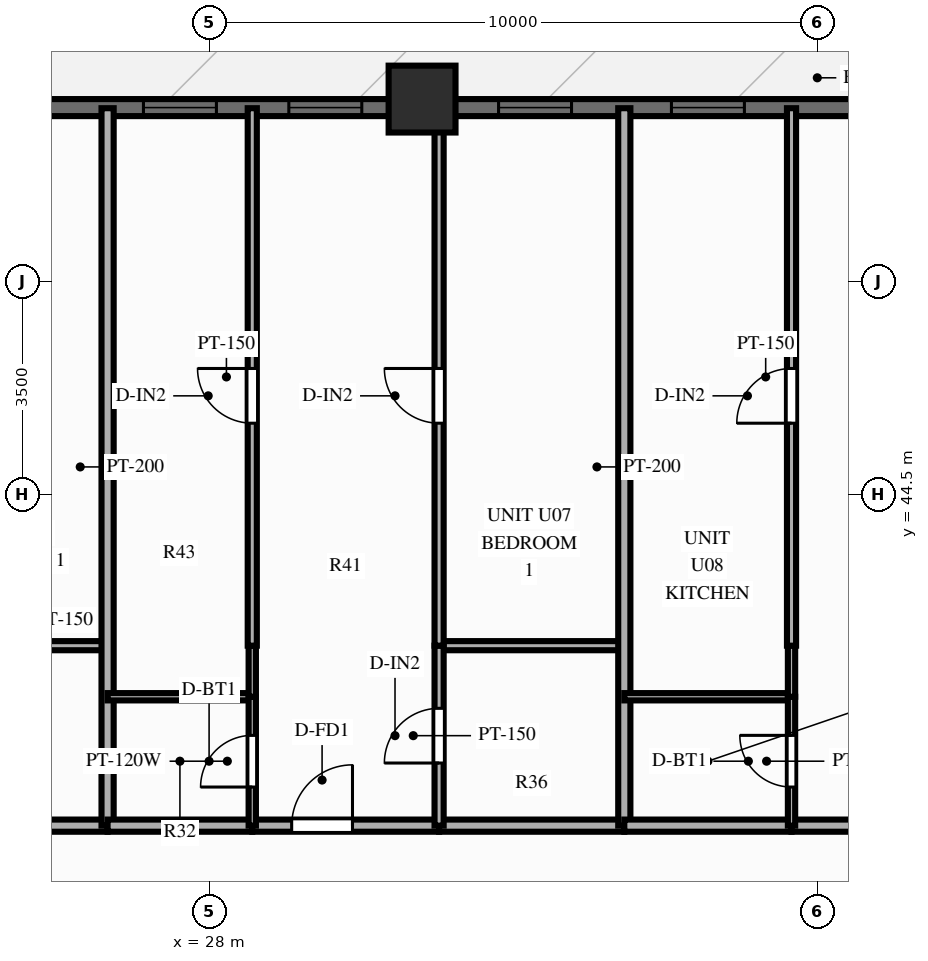
"""IFC4 building model, lengths in metres.
Left out: names, types, materials, properties, quantities, classifications, styles, units other than length and angle.
Written with IfcOpenShell. Run it as: python <this file> out.ifc"""

import sys

from ifc_helpers import new_model, si_unit, direction, frame, frame_2d, origin, origin_2d, place, context, subcontext, project, spatial, rectangle, extrude, source, transform, mapped, element, fill, save


model = new_model("IFC4")
c1 = context("Model", 3, precision=1e-05, world=origin(), true_north=direction((0.0, 1.0)))
c2 = subcontext(c1, "Body", "Model", "MODEL_VIEW")
j1 = project(units=[si_unit("LENGTHUNIT", "METRE"), si_unit("PLANEANGLEUNIT", "RADIAN")], contexts=[c1])
p1 = place(None, origin())
s1 = spatial("IfcSite", under=j1, at=p1, CompositionType="ELEMENT")
p2 = place(p1, origin())
s2 = spatial("IfcBuilding", under=s1, at=p2, CompositionType="ELEMENT")
p3 = place(p2, frame((0.0, 0.0, 61.4)))
s3 = spatial("IfcBuildingStorey", under=s2, at=p3, CompositionType="ELEMENT", Elevation=61.4)
m1 = source(origin(), c2, "Body", "SweptSolid", [
    extrude(rectangle(XDim=1.1, YDim=1.1, at=origin_2d()), origin(), (0.0, 0.0, 1.0), 3.0),
])
p4 = place(p3, frame((31.5, 51.0, 0.0), z_axis=(0.0, 0.0, 1.0), x_axis=(1.0, 0.0, 0.0)))
e1 = element("IfcColumn", 1, at=p4, inside=s3, PredefinedType="COLUMN", context=c2, shape_type="MappedRepresentation", body=[
    mapped(m1, transform((0.0, 0.0, 0.0), scale=1.0)),
])
p5 = place(p3, frame((15.5, 50.86, 0.0), z_axis=(0.0, 0.0, 1.0), x_axis=(1.0, 0.0, 0.0)))
e2 = element("IfcWall", 2, at=p5, inside=s3, PredefinedType="SOLIDWALL", context=c2, shape_type="SweptSolid", body=[
    extrude(rectangle(XDim=45.0, YDim=0.28, at=frame_2d((22.5, 0.0))), origin(), (0.0, 0.0, 1.0), 2.28),
])
p6 = place(p5, frame((0.76, 0.0, 0.25)))
e3 = element("IfcOpeningElement", 3, at=p6, cuts=e2, PredefinedType="OPENING", context=c2, shape_type="SweptSolid", body=[
    extrude(rectangle(XDim=1.2, YDim=1.5, at=frame_2d((0.6, 0.75))), frame((0.0, 0.152, 0.0), z_axis=(0.0, -1.0, 0.0), x_axis=(1.0, 0.0, 0.0)), (0.0, 0.0, 1.0), 0.304),
])
p7 = place(p5, frame((2.92, 0.0, 0.25)))
e4 = element("IfcOpeningElement", 4, at=p7, cuts=e2, PredefinedType="OPENING", context=c2, shape_type="SweptSolid", body=[
    extrude(rectangle(XDim=1.2, YDim=1.5, at=frame_2d((0.6, 0.75))), frame((0.0, 0.152, 0.0), z_axis=(0.0, -1.0, 0.0), x_axis=(1.0, 0.0, 0.0)), (0.0, 0.0, 1.0), 0.304),
])
p8 = place(p5, frame((5.554, 0.0, 0.25)))
e5 = element("IfcOpeningElement", 5, at=p8, cuts=e2, PredefinedType="OPENING", context=c2, shape_type="SweptSolid", body=[
    extrude(rectangle(XDim=1.2, YDim=1.5, at=frame_2d((0.6, 0.75))), frame((0.0, 0.152, 0.0), z_axis=(0.0, -1.0, 0.0), x_axis=(1.0, 0.0, 0.0)), (0.0, 0.0, 1.0), 0.304),
])
p9 = place(p5, frame((8.613, 0.0, 0.25)))
e6 = element("IfcOpeningElement", 6, at=p9, cuts=e2, PredefinedType="OPENING", context=c2, shape_type="SweptSolid", body=[
    extrude(rectangle(XDim=1.2, YDim=1.5, at=frame_2d((0.6, 0.75))), frame((0.0, 0.152, 0.0), z_axis=(0.0, -1.0, 0.0), x_axis=(1.0, 0.0, 0.0)), (0.0, 0.0, 1.0), 0.304),
])
p10 = place(p5, frame((11.418, 0.0, 0.25)))
e7 = element("IfcOpeningElement", 7, at=p10, cuts=e2, PredefinedType="OPENING", context=c2, shape_type="SweptSolid", body=[
    extrude(rectangle(XDim=1.2, YDim=1.5, at=frame_2d((0.6, 0.75))), frame((0.0, 0.152, 0.0), z_axis=(0.0, -1.0, 0.0), x_axis=(1.0, 0.0, 0.0)), (0.0, 0.0, 1.0), 0.304),
])
p11 = place(p5, frame((13.809, 0.0, 0.25)))
e8 = element("IfcOpeningElement", 8, at=p11, cuts=e2, PredefinedType="OPENING", context=c2, shape_type="SweptSolid", body=[
    extrude(rectangle(XDim=1.2, YDim=1.5, at=frame_2d((0.6, 0.75))), frame((0.0, 0.152, 0.0), z_axis=(0.0, -1.0, 0.0), x_axis=(1.0, 0.0, 0.0)), (0.0, 0.0, 1.0), 0.304),
])
p12 = place(p5, frame((17.258, 0.0, 0.25)))
e9 = element("IfcOpeningElement", 9, at=p12, cuts=e2, PredefinedType="OPENING", context=c2, shape_type="SweptSolid", body=[
    extrude(rectangle(XDim=1.2, YDim=1.5, at=frame_2d((0.6, 0.75))), frame((0.0, 0.152, 0.0), z_axis=(0.0, -1.0, 0.0), x_axis=(1.0, 0.0, 0.0)), (0.0, 0.0, 1.0), 0.304),
])
p13 = place(p5, frame((20.101, 0.0, 0.25)))
e10 = element("IfcOpeningElement", 10, at=p13, cuts=e2, PredefinedType="OPENING", context=c2, shape_type="SweptSolid", body=[
    extrude(rectangle(XDim=1.2, YDim=1.5, at=frame_2d((0.6, 0.75))), frame((0.0, 0.152, 0.0), z_axis=(0.0, -1.0, 0.0), x_axis=(1.0, 0.0, 0.0)), (0.0, 0.0, 1.0), 0.304),
])
p14 = place(p5, frame((24.793, 0.0, 0.0)))
e11 = element("IfcOpeningElement", 11, at=p14, cuts=e2, PredefinedType="OPENING", context=c2, shape_type="SweptSolid", body=[
    extrude(rectangle(XDim=1.1, YDim=2.15, at=frame_2d((0.55, 1.075))), frame((0.0, 0.152, 0.0), z_axis=(0.0, -1.0, 0.0), x_axis=(1.0, 0.0, 0.0)), (0.0, 0.0, 1.0), 0.304),
])
p15 = place(p5, frame((31.021, 0.0, 0.25)))
e12 = element("IfcOpeningElement", 12, at=p15, cuts=e2, PredefinedType="OPENING", context=c2, shape_type="SweptSolid", body=[
    extrude(rectangle(XDim=1.2, YDim=1.5, at=frame_2d((0.6, 0.75))), frame((0.0, 0.152, 0.0), z_axis=(0.0, -1.0, 0.0), x_axis=(1.0, 0.0, 0.0)), (0.0, 0.0, 1.0), 0.304),
])
p16 = place(p5, frame((33.869, 0.0, 0.25)))
e13 = element("IfcOpeningElement", 13, at=p16, cuts=e2, PredefinedType="OPENING", context=c2, shape_type="SweptSolid", body=[
    extrude(rectangle(XDim=1.2, YDim=1.5, at=frame_2d((0.6, 0.75))), frame((0.0, 0.152, 0.0), z_axis=(0.0, -1.0, 0.0), x_axis=(1.0, 0.0, 0.0)), (0.0, 0.0, 1.0), 0.304),
])
p17 = place(p5, frame((37.98, 0.0, 0.25)))
e14 = element("IfcOpeningElement", 14, at=p17, cuts=e2, PredefinedType="OPENING", context=c2, shape_type="SweptSolid", body=[
    extrude(rectangle(XDim=1.2, YDim=1.5, at=frame_2d((0.6, 0.75))), frame((0.0, 0.152, 0.0), z_axis=(0.0, -1.0, 0.0), x_axis=(1.0, 0.0, 0.0)), (0.0, 0.0, 1.0), 0.304),
])
p18 = place(p5, frame((42.277, 0.0, 0.25)))
e15 = element("IfcOpeningElement", 15, at=p18, cuts=e2, PredefinedType="OPENING", context=c2, shape_type="SweptSolid", body=[
    extrude(rectangle(XDim=1.2, YDim=1.5, at=frame_2d((0.6, 0.75))), frame((0.0, 0.152, 0.0), z_axis=(0.0, -1.0, 0.0), x_axis=(1.0, 0.0, 0.0)), (0.0, 0.0, 1.0), 0.304),
])
p19 = place(p3, frame((23.099, 39.05, 0.0), z_axis=(0.0, 0.0, 1.0), x_axis=(1.0, 0.0, 0.0)))
e16 = element("IfcWall", 16, at=p19, inside=s3, PredefinedType="PARTITIONING", context=c2, shape_type="SweptSolid", body=[
    extrude(rectangle(XDim=3.229, YDim=0.2, at=frame_2d((1.615, 0.0))), origin(), (0.0, 0.0, 1.0), 2.79),
])
p20 = place(p3, frame((23.099, 42.01, 0.0), z_axis=(0.0, 0.0, 1.0), x_axis=(1.0, 0.0, 0.0)))
e17 = element("IfcWall", 17, at=p20, inside=s3, PredefinedType="PARTITIONING", context=c2, shape_type="SweptSolid", body=[
    extrude(rectangle(XDim=3.229, YDim=0.15, at=frame_2d((1.615, 0.0))), origin(), (0.0, 0.0, 1.0), 2.79),
])
p21 = place(p3, frame((26.328, 39.05, 0.0), z_axis=(0.0, 0.0, 1.0), x_axis=(0.0, 1.0, 0.0)))
e18 = element("IfcWall", 18, at=p21, inside=s3, PredefinedType="PARTITIONING", context=c2, shape_type="SweptSolid", body=[
    extrude(rectangle(XDim=11.8, YDim=0.2, at=frame_2d((5.9, 0.0))), origin(), (0.0, 0.0, 1.0), 2.79),
])
p22 = place(p3, frame((26.328, 39.05, 0.0), z_axis=(0.0, 0.0, 1.0), x_axis=(1.0, 0.0, 0.0)))
e19 = element("IfcWall", 19, at=p22, inside=s3, PredefinedType="PARTITIONING", context=c2, shape_type="SweptSolid", body=[
    extrude(rectangle(XDim=2.38, YDim=0.2, at=frame_2d((1.19, 0.0))), origin(), (0.0, 0.0, 1.0), 2.79),
])
p23 = place(p3, frame((28.708, 39.05, 0.0), z_axis=(0.0, 0.0, 1.0), x_axis=(1.0, 0.0, 0.0)))
e20 = element("IfcWall", 20, at=p23, inside=s3, PredefinedType="PARTITIONING", context=c2, shape_type="SweptSolid", body=[
    extrude(rectangle(XDim=3.073, YDim=0.2, at=frame_2d((1.536, 0.0))), origin(), (0.0, 0.0, 1.0), 2.79),
])
p24 = place(p23, frame((0.648, 0.0, 0.0)))
e21 = element("IfcOpeningElement", 21, at=p24, cuts=e20, PredefinedType="OPENING", context=c2, shape_type="SweptSolid", body=[
    extrude(rectangle(XDim=1.0, YDim=2.15, at=frame_2d((0.5, 1.075))), frame((0.0, 0.112, 0.0), z_axis=(0.0, -1.0, 0.0), x_axis=(1.0, 0.0, 0.0)), (0.0, 0.0, 1.0), 0.224),
])
p25 = place(p3, frame((31.78, 39.05, 0.0), z_axis=(0.0, 0.0, 1.0), x_axis=(1.0, 0.0, 0.0)))
e22 = element("IfcWall", 22, at=p25, inside=s3, PredefinedType="PARTITIONING", context=c2, shape_type="SweptSolid", body=[
    extrude(rectangle(XDim=3.046, YDim=0.2, at=frame_2d((1.523, 0.0))), origin(), (0.0, 0.0, 1.0), 2.79),
])
p26 = place(p3, frame((26.328, 41.17, 0.0), z_axis=(0.0, 0.0, 1.0), x_axis=(1.0, 0.0, 0.0)))
e23 = element("IfcWall", 23, at=p26, inside=s3, PredefinedType="PARTITIONING", context=c2, shape_type="SweptSolid", body=[
    extrude(rectangle(XDim=2.38, YDim=0.12, at=frame_2d((1.19, 0.0))), origin(), (0.0, 0.0, 1.0), 2.79),
])
p27 = place(p3, frame((31.78, 42.01, 0.0), z_axis=(0.0, 0.0, 1.0), x_axis=(1.0, 0.0, 0.0)))
e24 = element("IfcWall", 24, at=p27, inside=s3, PredefinedType="PARTITIONING", context=c2, shape_type="SweptSolid", body=[
    extrude(rectangle(XDim=3.046, YDim=0.15, at=frame_2d((1.523, 0.0))), origin(), (0.0, 0.0, 1.0), 2.79),
])
p28 = place(p3, frame((28.708, 39.05, 0.0), z_axis=(0.0, 0.0, 1.0), x_axis=(0.0, 1.0, 0.0)))
e25 = element("IfcWall", 25, at=p28, inside=s3, PredefinedType="PARTITIONING", context=c2, shape_type="SweptSolid", body=[
    extrude(rectangle(XDim=2.12, YDim=0.12, at=frame_2d((1.06, 0.0))), origin(), (0.0, 0.0, 1.0), 2.79),
])
p29 = place(p28, frame((0.635, 0.0, 0.0)))
e26 = element("IfcOpeningElement", 26, at=p29, cuts=e25, PredefinedType="OPENING", context=c2, shape_type="SweptSolid", body=[
    extrude(rectangle(XDim=0.85, YDim=2.05, at=frame_2d((0.425, 1.025))), frame((0.0, 0.072, 0.0), z_axis=(0.0, -1.0, 0.0), x_axis=(1.0, 0.0, 0.0)), (0.0, 0.0, 1.0), 0.144),
])
p30 = place(p3, frame((28.708, 41.17, 0.0), z_axis=(0.0, 0.0, 1.0), x_axis=(0.0, 1.0, 0.0)))
e27 = element("IfcWall", 27, at=p30, inside=s3, PredefinedType="PARTITIONING", context=c2, shape_type="SweptSolid", body=[
    extrude(rectangle(XDim=0.84, YDim=0.12, at=frame_2d((0.42, 0.0))), origin(), (0.0, 0.0, 1.0), 2.79),
])
p31 = place(p3, frame((28.708, 42.01, 0.0), z_axis=(0.0, 0.0, 1.0), x_axis=(0.0, 1.0, 0.0)))
e28 = element("IfcWall", 28, at=p31, inside=s3, PredefinedType="PARTITIONING", context=c2, shape_type="SweptSolid", body=[
    extrude(rectangle(XDim=8.84, YDim=0.15, at=frame_2d((4.42, 0.0))), origin(), (0.0, 0.0, 1.0), 2.79),
])
p32 = place(p31, frame((3.659, 0.0, 0.0)))
e29 = element("IfcOpeningElement", 29, at=p32, cuts=e28, PredefinedType="OPENING", context=c2, shape_type="SweptSolid", body=[
    extrude(rectangle(XDim=0.9, YDim=2.1, at=frame_2d((0.45, 1.05))), frame((0.0, 0.087, 0.0), z_axis=(0.0, -1.0, 0.0), x_axis=(1.0, 0.0, 0.0)), (0.0, 0.0, 1.0), 0.174),
])
p33 = place(p3, frame((31.78, 39.05, 0.0), z_axis=(0.0, 0.0, 1.0), x_axis=(0.0, 1.0, 0.0)))
e30 = element("IfcWall", 30, at=p33, inside=s3, PredefinedType="PARTITIONING", context=c2, shape_type="SweptSolid", body=[
    extrude(rectangle(XDim=2.96, YDim=0.15, at=frame_2d((1.48, 0.0))), origin(), (0.0, 0.0, 1.0), 2.79),
])
p34 = place(p33, frame((1.03, 0.0, 0.0)))
e31 = element("IfcOpeningElement", 31, at=p34, cuts=e30, PredefinedType="OPENING", context=c2, shape_type="SweptSolid", body=[
    extrude(rectangle(XDim=0.9, YDim=2.1, at=frame_2d((0.45, 1.05))), frame((0.0, 0.087, 0.0), z_axis=(0.0, -1.0, 0.0), x_axis=(1.0, 0.0, 0.0)), (0.0, 0.0, 1.0), 0.174),
])
p35 = place(p3, frame((31.78, 42.01, 0.0), z_axis=(0.0, 0.0, 1.0), x_axis=(0.0, 1.0, 0.0)))
e32 = element("IfcWall", 32, at=p35, inside=s3, PredefinedType="PARTITIONING", context=c2, shape_type="SweptSolid", body=[
    extrude(rectangle(XDim=8.84, YDim=0.15, at=frame_2d((4.42, 0.0))), origin(), (0.0, 0.0, 1.0), 2.79),
])
p36 = place(p35, frame((3.659, 0.0, 0.0)))
e33 = element("IfcOpeningElement", 33, at=p36, cuts=e32, PredefinedType="OPENING", context=c2, shape_type="SweptSolid", body=[
    extrude(rectangle(XDim=0.9, YDim=2.1, at=frame_2d((0.45, 1.05))), frame((0.0, 0.087, 0.0), z_axis=(0.0, -1.0, 0.0), x_axis=(1.0, 0.0, 0.0)), (0.0, 0.0, 1.0), 0.174),
])
p37 = place(p3, frame((34.826, 39.05, 0.0), z_axis=(0.0, 0.0, 1.0), x_axis=(0.0, 1.0, 0.0)))
e34 = element("IfcWall", 34, at=p37, inside=s3, PredefinedType="PARTITIONING", context=c2, shape_type="SweptSolid", body=[
    extrude(rectangle(XDim=11.8, YDim=0.2, at=frame_2d((5.9, 0.0))), origin(), (0.0, 0.0, 1.0), 2.79),
])
p38 = place(p3, frame((34.826, 39.05, 0.0), z_axis=(0.0, 0.0, 1.0), x_axis=(1.0, 0.0, 0.0)))
e35 = element("IfcWall", 35, at=p38, inside=s3, PredefinedType="PARTITIONING", context=c2, shape_type="SweptSolid", body=[
    extrude(rectangle(XDim=2.75, YDim=0.2, at=frame_2d((1.375, 0.0))), origin(), (0.0, 0.0, 1.0), 2.79),
])
p39 = place(p3, frame((37.576, 39.05, 0.0), z_axis=(0.0, 0.0, 1.0), x_axis=(1.0, 0.0, 0.0)))
e36 = element("IfcWall", 36, at=p39, inside=s3, PredefinedType="PARTITIONING", context=c2, shape_type="SweptSolid", body=[
    extrude(rectangle(XDim=8.244, YDim=0.2, at=frame_2d((4.122, 0.0))), origin(), (0.0, 0.0, 1.0), 2.79),
])
p40 = place(p39, frame((3.622, 0.0, 0.0)))
e37 = element("IfcOpeningElement", 37, at=p40, cuts=e36, PredefinedType="OPENING", context=c2, shape_type="SweptSolid", body=[
    extrude(rectangle(XDim=1.0, YDim=2.15, at=frame_2d((0.5, 1.075))), frame((0.0, 0.112, 0.0), z_axis=(0.0, -1.0, 0.0), x_axis=(1.0, 0.0, 0.0)), (0.0, 0.0, 1.0), 0.224),
])
p41 = place(p3, frame((34.826, 41.17, 0.0), z_axis=(0.0, 0.0, 1.0), x_axis=(1.0, 0.0, 0.0)))
e38 = element("IfcWall", 38, at=p41, inside=s3, PredefinedType="PARTITIONING", context=c2, shape_type="SweptSolid", body=[
    extrude(rectangle(XDim=2.75, YDim=0.12, at=frame_2d((1.375, 0.0))), origin(), (0.0, 0.0, 1.0), 2.79),
])
p42 = place(p3, frame((37.576, 39.05, 0.0), z_axis=(0.0, 0.0, 1.0), x_axis=(0.0, 1.0, 0.0)))
e39 = element("IfcWall", 39, at=p42, inside=s3, PredefinedType="PARTITIONING", context=c2, shape_type="SweptSolid", body=[
    extrude(rectangle(XDim=2.12, YDim=0.12, at=frame_2d((1.06, 0.0))), origin(), (0.0, 0.0, 1.0), 2.79),
])
p43 = place(p42, frame((0.635, 0.0, 0.0)))
e40 = element("IfcOpeningElement", 40, at=p43, cuts=e39, PredefinedType="OPENING", context=c2, shape_type="SweptSolid", body=[
    extrude(rectangle(XDim=0.85, YDim=2.05, at=frame_2d((0.425, 1.025))), frame((0.0, 0.072, 0.0), z_axis=(0.0, -1.0, 0.0), x_axis=(1.0, 0.0, 0.0)), (0.0, 0.0, 1.0), 0.144),
])
p44 = place(p3, frame((37.576, 41.17, 0.0), z_axis=(0.0, 0.0, 1.0), x_axis=(0.0, 1.0, 0.0)))
e41 = element("IfcWall", 41, at=p44, inside=s3, PredefinedType="PARTITIONING", context=c2, shape_type="SweptSolid", body=[
    extrude(rectangle(XDim=0.84, YDim=0.12, at=frame_2d((0.42, 0.0))), origin(), (0.0, 0.0, 1.0), 2.79),
])
p45 = place(p3, frame((37.576, 42.01, 0.0), z_axis=(0.0, 0.0, 1.0), x_axis=(0.0, 1.0, 0.0)))
e42 = element("IfcWall", 42, at=p45, inside=s3, PredefinedType="PARTITIONING", context=c2, shape_type="SweptSolid", body=[
    extrude(rectangle(XDim=8.84, YDim=0.15, at=frame_2d((4.42, 0.0))), origin(), (0.0, 0.0, 1.0), 2.79),
])
p46 = place(p45, frame((3.659, 0.0, 0.0)))
e43 = element("IfcOpeningElement", 43, at=p46, cuts=e42, PredefinedType="OPENING", context=c2, shape_type="SweptSolid", body=[
    extrude(rectangle(XDim=0.9, YDim=2.1, at=frame_2d((0.45, 1.05))), frame((0.0, 0.087, 0.0), z_axis=(0.0, -1.0, 0.0), x_axis=(1.0, 0.0, 0.0)), (0.0, 0.0, 1.0), 0.174),
])
m2 = source(origin(), c2, "Body", "SweptSolid", [
    extrude(rectangle(XDim=1.2, YDim=1.5, at=frame_2d((0.6, 0.75))), frame((0.0, 0.03, 0.0), z_axis=(0.0, -1.0, 0.0), x_axis=(1.0, 0.0, 0.0)), (0.0, 0.0, 1.0), 0.06),
])
p47 = place(p10, origin())
e44 = element("IfcWindow", 44, at=p47, inside=s3, PartitioningType="SINGLE_PANEL", PredefinedType="WINDOW", context=c2, shape_type="MappedRepresentation", body=[
    mapped(m2, transform((0.0, 0.0, 0.0), scale=1.0)),
])
fill(e7, e44)
p48 = place(p11, origin())
e45 = element("IfcWindow", 45, at=p48, inside=s3, PartitioningType="SINGLE_PANEL", PredefinedType="WINDOW", context=c2, shape_type="MappedRepresentation", body=[
    mapped(m2, transform((0.0, 0.0, 0.0), scale=1.0)),
])
fill(e8, e45)
p49 = place(p12, origin())
e46 = element("IfcWindow", 46, at=p49, inside=s3, PartitioningType="SINGLE_PANEL", PredefinedType="WINDOW", context=c2, shape_type="MappedRepresentation", body=[
    mapped(m2, transform((0.0, 0.0, 0.0), scale=1.0)),
])
fill(e9, e46)
p50 = place(p13, origin())
e47 = element("IfcWindow", 47, at=p50, inside=s3, PartitioningType="SINGLE_PANEL", PredefinedType="WINDOW", context=c2, shape_type="MappedRepresentation", body=[
    mapped(m2, transform((0.0, 0.0, 0.0), scale=1.0)),
])
fill(e10, e47)
m3 = source(origin(), c2, "Body", "SweptSolid", [
    extrude(rectangle(XDim=1.0, YDim=2.15, at=frame_2d((0.5, 1.075))), frame((0.0, 0.025, 0.0), z_axis=(0.0, -1.0, 0.0), x_axis=(1.0, 0.0, 0.0)), (0.0, 0.0, 1.0), 0.05),
])
p51 = place(p24, origin())
e48 = element("IfcDoor", 48, at=p51, inside=s3, OperationType="SINGLE_SWING_RIGHT", PredefinedType="DOOR", context=c2, shape_type="MappedRepresentation", body=[
    mapped(m3, transform((0.0, 0.0, 0.0), scale=1.0)),
])
fill(e21, e48)
m4 = source(origin(), c2, "Body", "SweptSolid", [
    extrude(rectangle(XDim=0.85, YDim=2.05, at=frame_2d((0.425, 1.025))), frame((0.0, 0.025, 0.0), z_axis=(0.0, -1.0, 0.0), x_axis=(1.0, 0.0, 0.0)), (0.0, 0.0, 1.0), 0.05),
])
p52 = place(p29, origin())
e49 = element("IfcDoor", 49, at=p52, inside=s3, OperationType="SINGLE_SWING_LEFT", PredefinedType="DOOR", context=c2, shape_type="MappedRepresentation", body=[
    mapped(m4, transform((0.0, 0.0, 0.0), scale=1.0)),
])
fill(e26, e49)
m5 = source(origin(), c2, "Body", "SweptSolid", [
    extrude(rectangle(XDim=0.9, YDim=2.1, at=frame_2d((0.45, 1.05))), frame((0.0, 0.025, 0.0), z_axis=(0.0, -1.0, 0.0), x_axis=(1.0, 0.0, 0.0)), (0.0, 0.0, 1.0), 0.05),
])
p53 = place(p32, origin())
e50 = element("IfcDoor", 50, at=p53, inside=s3, OperationType="SINGLE_SWING_RIGHT", PredefinedType="DOOR", context=c2, shape_type="MappedRepresentation", body=[
    mapped(m5, transform((0.0, 0.0, 0.0), scale=1.0)),
])
fill(e29, e50)
p54 = place(p34, origin())
e51 = element("IfcDoor", 51, at=p54, inside=s3, OperationType="SINGLE_SWING_LEFT", PredefinedType="DOOR", context=c2, shape_type="MappedRepresentation", body=[
    mapped(m5, transform((0.0, 0.0, 0.0), scale=1.0)),
])
fill(e31, e51)
p55 = place(p36, origin())
e52 = element("IfcDoor", 52, at=p55, inside=s3, OperationType="SINGLE_SWING_RIGHT", PredefinedType="DOOR", context=c2, shape_type="MappedRepresentation", body=[
    mapped(m5, transform((0.0, 0.0, 0.0), scale=1.0)),
])
fill(e33, e52)
p56 = place(p43, origin())
e53 = element("IfcDoor", 53, at=p56, inside=s3, OperationType="SINGLE_SWING_RIGHT", PredefinedType="DOOR", context=c2, shape_type="MappedRepresentation", body=[
    mapped(m4, transform((0.0, 0.0, 0.0), scale=1.0)),
])
fill(e40, e53)
p57 = place(p46, origin())
e54 = element("IfcDoor", 54, at=p57, inside=s3, OperationType="SINGLE_SWING_LEFT", PredefinedType="DOOR", context=c2, shape_type="MappedRepresentation", body=[
    mapped(m5, transform((0.0, 0.0, 0.0), scale=1.0)),
])
fill(e43, e54)
save(model, sys.argv[1])
